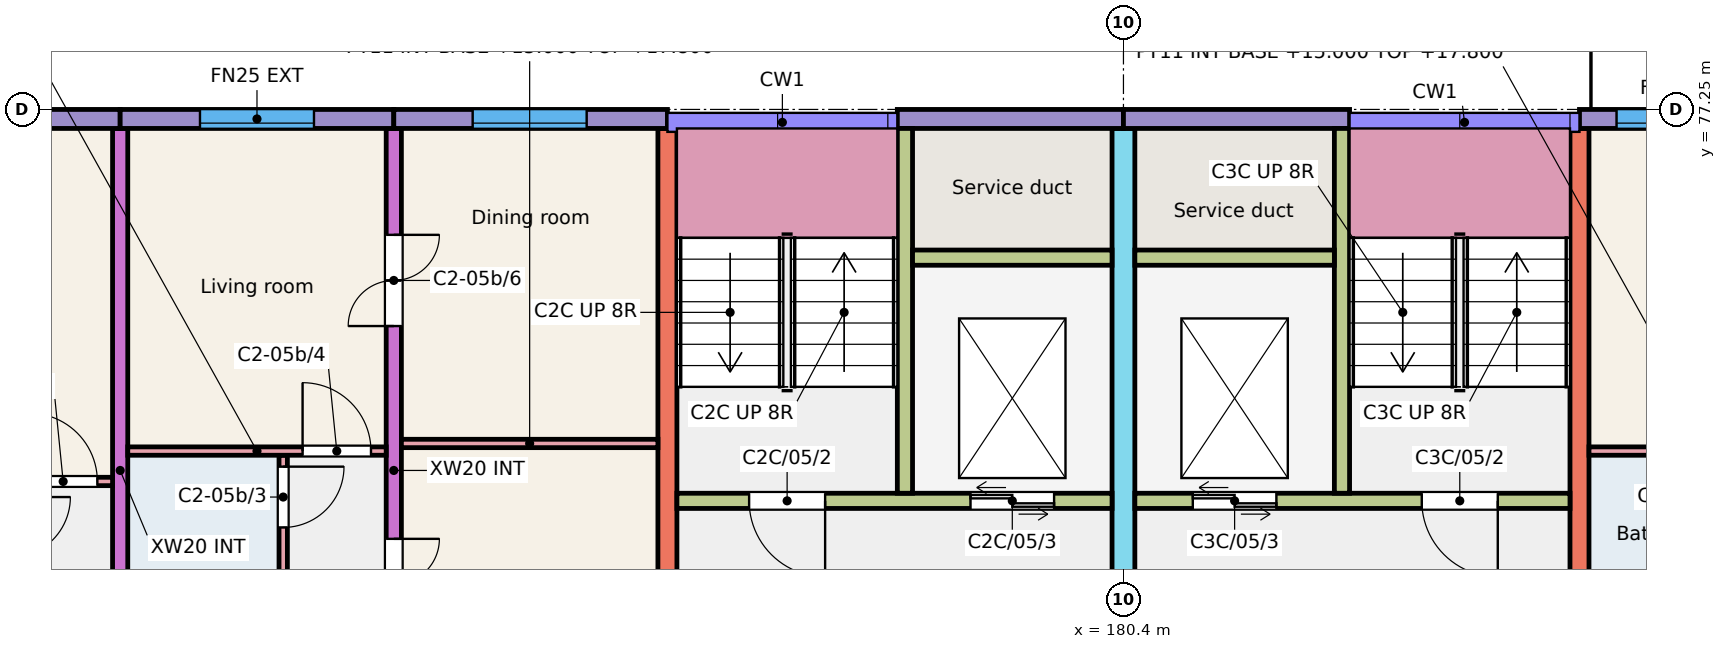
"""IFC4 building model, lengths in metres.
Left out: names, types, materials, properties, quantities, classifications, styles, units other than length and angle.
Written with IfcOpenShell. Run it as: python <this file> out.ifc"""

import sys

from ifc_helpers import new_model, si_unit, direction, frame, frame_2d, origin, place, context, subcontext, project, spatial, rectangle, extrude, element, fill, save


model = new_model("IFC4")
c1 = context("Model", 3, precision=1e-05, world=origin(), true_north=direction((0.0, 1.0)))
c2 = subcontext(c1, "Body", "Model", "MODEL_VIEW")
j1 = project(units=[si_unit("LENGTHUNIT", "METRE"), si_unit("PLANEANGLEUNIT", "RADIAN")], contexts=[c1])
p1 = place(None, origin())
s1 = spatial("IfcSite", under=j1, at=p1, CompositionType="ELEMENT")
p2 = place(p1, origin())
s2 = spatial("IfcBuilding", under=s1, at=p2, CompositionType="ELEMENT")
p3 = place(p2, frame((0.0, 0.0, 15.0)))
s3 = spatial("IfcBuildingStorey", under=s2, at=p3, CompositionType="ELEMENT", Elevation=15.0)
p4 = place(p3, frame((167.2, 68.0, 0.0), z_axis=(0.0, 0.0, 1.0), x_axis=(0.0, 1.0, 0.0)))
e1 = element("IfcWall", 1, at=p4, inside=s3, PredefinedType="SHEAR", context=c2, shape_type="SweptSolid", body=[
    extrude(rectangle(XDim=9.0, YDim=0.2, at=frame_2d((4.5, 0.0))), origin(), (0.0, 0.0, 1.0), 3.0),
])
p5 = place(p3, frame((170.8, 68.0, 0.0), z_axis=(0.0, 0.0, 1.0), x_axis=(0.0, 1.0, 0.0)))
e2 = element("IfcWall", 2, at=p5, inside=s3, PredefinedType="SHEAR", context=c2, shape_type="SweptSolid", body=[
    extrude(rectangle(XDim=9.0, YDim=0.2, at=frame_2d((4.5, 0.0))), origin(), (0.0, 0.0, 1.0), 3.0),
])
p6 = place(p5, frame((2.4, 0.0, 0.0)))
e3 = element("IfcOpeningElement", 3, at=p6, cuts=e2, PredefinedType="OPENING", context=c2, shape_type="SweptSolid", body=[
    extrude(rectangle(XDim=1.2, YDim=2.1, at=frame_2d((0.6, 1.05))), frame((0.0, 0.11, 0.0), z_axis=(0.0, -1.0, 0.0), x_axis=(1.0, 0.0, 0.0)), (0.0, 0.0, 1.0), 0.22),
])
p7 = place(p5, frame((6.4, 0.0, 0.0)))
e4 = element("IfcOpeningElement", 4, at=p7, cuts=e2, PredefinedType="OPENING", context=c2, shape_type="SweptSolid", body=[
    extrude(rectangle(XDim=1.2, YDim=2.1, at=frame_2d((0.6, 1.05))), frame((0.0, 0.11, 0.0), z_axis=(0.0, -1.0, 0.0), x_axis=(1.0, 0.0, 0.0)), (0.0, 0.0, 1.0), 0.22),
])
p8 = place(p3, frame((174.4, 68.0, 0.0), z_axis=(0.0, 0.0, 1.0), x_axis=(0.0, 1.0, 0.0)))
e5 = element("IfcWall", 5, at=p8, inside=s3, PredefinedType="SHEAR", context=c2, shape_type="SweptSolid", body=[
    extrude(rectangle(XDim=9.0, YDim=0.25, at=frame_2d((4.5, 0.0))), origin(), (0.0, 0.0, 1.0), 3.0),
])
p9 = place(p3, frame((180.4, 66.0, 0.0), z_axis=(0.0, 0.0, 1.0), x_axis=(0.0, 1.0, 0.0)))
e6 = element("IfcWall", 6, at=p9, inside=s3, PredefinedType="SHEAR", context=c2, shape_type="SweptSolid", body=[
    extrude(rectangle(XDim=11.0, YDim=0.3, at=frame_2d((5.5, 0.0))), origin(), (0.0, 0.0, 1.0), 3.0),
])
p10 = place(p9, frame((0.3, 0.0, 0.0)))
e7 = element("IfcOpeningElement", 7, at=p10, cuts=e6, PredefinedType="OPENING", context=c2, shape_type="SweptSolid", body=[
    extrude(rectangle(XDim=1.2, YDim=2.1, at=frame_2d((0.6, 1.05))), frame((0.0, 0.16, 0.0), z_axis=(0.0, -1.0, 0.0), x_axis=(1.0, 0.0, 0.0)), (0.0, 0.0, 1.0), 0.32),
])
p11 = place(p3, frame((186.4, 68.0, 0.0), z_axis=(0.0, 0.0, 1.0), x_axis=(0.0, 1.0, 0.0)))
e8 = element("IfcWall", 8, at=p11, inside=s3, PredefinedType="SHEAR", context=c2, shape_type="SweptSolid", body=[
    extrude(rectangle(XDim=9.0, YDim=0.25, at=frame_2d((4.5, 0.0))), origin(), (0.0, 0.0, 1.0), 3.0),
])
p12 = place(p3, frame((163.6, 77.125, 0.0), z_axis=(0.0, 0.0, 1.0), x_axis=(1.0, 0.0, 0.0)))
e9 = element("IfcWall", 9, at=p12, inside=s3, PredefinedType="SOLIDWALL", context=c2, shape_type="SweptSolid", body=[
    extrude(rectangle(XDim=3.6, YDim=0.25, at=frame_2d((1.8, 0.0))), origin(), (0.0, 0.0, 1.0), 3.0),
])
p13 = place(p12, frame((1.075, 0.0, 0.9)))
e10 = element("IfcOpeningElement", 10, at=p13, cuts=e9, PredefinedType="OPENING", context=c2, shape_type="SweptSolid", body=[
    extrude(rectangle(XDim=1.5, YDim=1.5, at=frame_2d((0.75, 0.75))), frame((0.0, 0.135, 0.0), z_axis=(0.0, -1.0, 0.0), x_axis=(1.0, 0.0, 0.0)), (0.0, 0.0, 1.0), 0.27),
])
p14 = place(p3, frame((167.2, 77.125, 0.0), z_axis=(0.0, 0.0, 1.0), x_axis=(1.0, 0.0, 0.0)))
e11 = element("IfcWall", 11, at=p14, inside=s3, PredefinedType="SOLIDWALL", context=c2, shape_type="SweptSolid", body=[
    extrude(rectangle(XDim=3.6, YDim=0.25, at=frame_2d((1.8, 0.0))), origin(), (0.0, 0.0, 1.0), 3.0),
])
p15 = place(p14, frame((1.05, 0.0, 0.9)))
e12 = element("IfcOpeningElement", 12, at=p15, cuts=e11, PredefinedType="OPENING", context=c2, shape_type="SweptSolid", body=[
    extrude(rectangle(XDim=1.5, YDim=1.5, at=frame_2d((0.75, 0.75))), frame((0.0, 0.135, 0.0), z_axis=(0.0, -1.0, 0.0), x_axis=(1.0, 0.0, 0.0)), (0.0, 0.0, 1.0), 0.27),
])
p16 = place(p3, frame((170.8, 77.125, 0.0), z_axis=(0.0, 0.0, 1.0), x_axis=(1.0, 0.0, 0.0)))
e13 = element("IfcWall", 13, at=p16, inside=s3, PredefinedType="SOLIDWALL", context=c2, shape_type="SweptSolid", body=[
    extrude(rectangle(XDim=3.6, YDim=0.25, at=frame_2d((1.8, 0.0))), origin(), (0.0, 0.0, 1.0), 3.0),
])
p17 = place(p16, frame((1.038, 0.0, 0.9)))
e14 = element("IfcOpeningElement", 14, at=p17, cuts=e13, PredefinedType="OPENING", context=c2, shape_type="SweptSolid", body=[
    extrude(rectangle(XDim=1.5, YDim=1.5, at=frame_2d((0.75, 0.75))), frame((0.0, 0.135, 0.0), z_axis=(0.0, -1.0, 0.0), x_axis=(1.0, 0.0, 0.0)), (0.0, 0.0, 1.0), 0.27),
])
p18 = place(p3, frame((177.425, 77.125, 0.0), z_axis=(0.0, 0.0, 1.0), x_axis=(1.0, 0.0, 0.0)))
e15 = element("IfcWall", 15, at=p18, inside=s3, PredefinedType="SOLIDWALL", context=c2, shape_type="SweptSolid", body=[
    extrude(rectangle(XDim=2.975, YDim=0.25, at=frame_2d((1.487, 0.0))), origin(), (0.0, 0.0, 1.0), 3.0),
])
p19 = place(p3, frame((174.525, 72.1, 0.0), z_axis=(0.0, 0.0, 1.0), x_axis=(1.0, 0.0, 0.0)))
e16 = element("IfcWall", 16, at=p19, inside=s3, PredefinedType="SHEAR", context=c2, shape_type="SweptSolid", body=[
    extrude(rectangle(XDim=5.725, YDim=0.2, at=frame_2d((2.863, 0.0))), origin(), (0.0, 0.0, 1.0), 3.0),
])
p20 = place(p19, frame((0.95, 0.0, 0.0)))
e17 = element("IfcOpeningElement", 17, at=p20, cuts=e16, PredefinedType="OPENING", context=c2, shape_type="SweptSolid", body=[
    extrude(rectangle(XDim=1.0, YDim=2.1, at=frame_2d((0.5, 1.05))), frame((0.0, 0.11, 0.0), z_axis=(0.0, -1.0, 0.0), x_axis=(1.0, 0.0, 0.0)), (0.0, 0.0, 1.0), 0.22),
])
p21 = place(p19, frame((3.863, 0.0, 0.0)))
e18 = element("IfcOpeningElement", 18, at=p21, cuts=e16, PredefinedType="OPENING", context=c2, shape_type="SweptSolid", body=[
    extrude(rectangle(XDim=1.1, YDim=2.1, at=frame_2d((0.55, 1.05))), frame((0.0, 0.11, 0.0), z_axis=(0.0, -1.0, 0.0), x_axis=(1.0, 0.0, 0.0)), (0.0, 0.0, 1.0), 0.22),
])
p22 = place(p3, frame((177.525, 72.2, 0.0), z_axis=(0.0, 0.0, 1.0), x_axis=(0.0, 1.0, 0.0)))
e19 = element("IfcWall", 19, at=p22, inside=s3, PredefinedType="SHEAR", context=c2, shape_type="SweptSolid", body=[
    extrude(rectangle(XDim=4.8, YDim=0.2, at=frame_2d((2.4, 0.0))), origin(), (0.0, 0.0, 1.0), 3.0),
])
p23 = place(p3, frame((177.625, 75.3, 0.0), z_axis=(0.0, 0.0, 1.0), x_axis=(1.0, 0.0, 0.0)))
e20 = element("IfcWall", 20, at=p23, inside=s3, PredefinedType="SHEAR", context=c2, shape_type="SweptSolid", body=[
    extrude(rectangle(XDim=2.625, YDim=0.2, at=frame_2d((1.312, 0.0))), origin(), (0.0, 0.0, 1.0), 3.0),
])
p24 = place(p3, frame((180.4, 77.125, 0.0), z_axis=(0.0, 0.0, 1.0), x_axis=(1.0, 0.0, 0.0)))
e21 = element("IfcWall", 21, at=p24, inside=s3, PredefinedType="SOLIDWALL", context=c2, shape_type="SweptSolid", body=[
    extrude(rectangle(XDim=2.975, YDim=0.25, at=frame_2d((1.488, 0.0))), origin(), (0.0, 0.0, 1.0), 3.0),
])
p25 = place(p3, frame((180.55, 72.1, 0.0), z_axis=(0.0, 0.0, 1.0), x_axis=(1.0, 0.0, 0.0)))
e22 = element("IfcWall", 22, at=p25, inside=s3, PredefinedType="SHEAR", context=c2, shape_type="SweptSolid", body=[
    extrude(rectangle(XDim=5.725, YDim=0.2, at=frame_2d((2.862, 0.0))), origin(), (0.0, 0.0, 1.0), 3.0),
])
p26 = place(p25, frame((3.775, 0.0, 0.0)))
e23 = element("IfcOpeningElement", 23, at=p26, cuts=e22, PredefinedType="OPENING", context=c2, shape_type="SweptSolid", body=[
    extrude(rectangle(XDim=1.0, YDim=2.1, at=frame_2d((0.5, 1.05))), frame((0.0, 0.11, 0.0), z_axis=(0.0, -1.0, 0.0), x_axis=(1.0, 0.0, 0.0)), (0.0, 0.0, 1.0), 0.22),
])
p27 = place(p25, frame((0.762, 0.0, 0.0)))
e24 = element("IfcOpeningElement", 24, at=p27, cuts=e22, PredefinedType="OPENING", context=c2, shape_type="SweptSolid", body=[
    extrude(rectangle(XDim=1.1, YDim=2.1, at=frame_2d((0.55, 1.05))), frame((0.0, 0.11, 0.0), z_axis=(0.0, -1.0, 0.0), x_axis=(1.0, 0.0, 0.0)), (0.0, 0.0, 1.0), 0.22),
])
p28 = place(p3, frame((183.275, 72.2, 0.0), z_axis=(0.0, 0.0, 1.0), x_axis=(0.0, 1.0, 0.0)))
e25 = element("IfcWall", 25, at=p28, inside=s3, PredefinedType="SHEAR", context=c2, shape_type="SweptSolid", body=[
    extrude(rectangle(XDim=4.8, YDim=0.2, at=frame_2d((2.4, 0.0))), origin(), (0.0, 0.0, 1.0), 3.0),
])
p29 = place(p3, frame((180.55, 75.3, 0.0), z_axis=(0.0, 0.0, 1.0), x_axis=(1.0, 0.0, 0.0)))
e26 = element("IfcWall", 26, at=p29, inside=s3, PredefinedType="SHEAR", context=c2, shape_type="SweptSolid", body=[
    extrude(rectangle(XDim=2.625, YDim=0.2, at=frame_2d((1.312, 0.0))), origin(), (0.0, 0.0, 1.0), 3.0),
])
p30 = place(p3, frame((186.4, 77.125, 0.0), z_axis=(0.0, 0.0, 1.0), x_axis=(1.0, 0.0, 0.0)))
e27 = element("IfcWall", 27, at=p30, inside=s3, PredefinedType="SOLIDWALL", context=c2, shape_type="SweptSolid", body=[
    extrude(rectangle(XDim=3.6, YDim=0.25, at=frame_2d((1.8, 0.0))), origin(), (0.0, 0.0, 1.0), 3.0),
])
p31 = place(p30, frame((0.488, 0.0, 0.9)))
e28 = element("IfcOpeningElement", 28, at=p31, cuts=e27, PredefinedType="OPENING", context=c2, shape_type="SweptSolid", body=[
    extrude(rectangle(XDim=1.5, YDim=1.5, at=frame_2d((0.75, 0.75))), frame((0.0, 0.135, 0.0), z_axis=(0.0, -1.0, 0.0), x_axis=(1.0, 0.0, 0.0)), (0.0, 0.0, 1.0), 0.27),
])
p32 = place(p30, frame((2.45, 0.0, 0.0)))
e29 = element("IfcOpeningElement", 29, at=p32, cuts=e27, PredefinedType="OPENING", context=c2, shape_type="SweptSolid", body=[
    extrude(rectangle(XDim=1.0, YDim=2.1, at=frame_2d((0.5, 1.05))), frame((0.0, 0.135, 0.0), z_axis=(0.0, -1.0, 0.0), x_axis=(1.0, 0.0, 0.0)), (0.0, 0.0, 1.0), 0.27),
])
p33 = place(p3, frame((163.75, 72.355, 0.0), z_axis=(0.0, 0.0, 1.0), x_axis=(1.0, 0.0, 0.0)))
e30 = element("IfcWall", 30, at=p33, inside=s3, PredefinedType="PARTITIONING", context=c2, shape_type="SweptSolid", body=[
    extrude(rectangle(XDim=3.35, YDim=0.11, at=frame_2d((1.675, 0.0))), origin(), (0.0, 0.0, 1.0), 2.8),
])
p34 = place(p33, frame((2.25, 0.0, 0.0)))
e31 = element("IfcOpeningElement", 31, at=p34, cuts=e30, PredefinedType="OPENING", context=c2, shape_type="SweptSolid", body=[
    extrude(rectangle(XDim=0.9, YDim=2.1, at=frame_2d((0.45, 1.05))), frame((0.0, 0.065, 0.0), z_axis=(0.0, -1.0, 0.0), x_axis=(1.0, 0.0, 0.0)), (0.0, 0.0, 1.0), 0.13),
])
p35 = place(p3, frame((169.345, 68.0, 0.0), z_axis=(0.0, 0.0, 1.0), x_axis=(0.0, 1.0, 0.0)))
e32 = element("IfcWall", 32, at=p35, inside=s3, PredefinedType="PARTITIONING", context=c2, shape_type="SweptSolid", body=[
    extrude(rectangle(XDim=4.7, YDim=0.11, at=frame_2d((2.35, 0.0))), origin(), (0.0, 0.0, 1.0), 2.8),
])
p36 = place(p35, frame((0.2, 0.0, 0.0)))
e33 = element("IfcOpeningElement", 33, at=p36, cuts=e32, PredefinedType="OPENING", context=c2, shape_type="SweptSolid", body=[
    extrude(rectangle(XDim=0.8, YDim=2.1, at=frame_2d((0.4, 1.05))), frame((0.0, 0.065, 0.0), z_axis=(0.0, -1.0, 0.0), x_axis=(1.0, 0.0, 0.0)), (0.0, 0.0, 1.0), 0.13),
])
p37 = place(p35, frame((3.75, 0.0, 0.0)))
e34 = element("IfcOpeningElement", 34, at=p37, cuts=e32, PredefinedType="OPENING", context=c2, shape_type="SweptSolid", body=[
    extrude(rectangle(XDim=0.8, YDim=2.1, at=frame_2d((0.4, 1.05))), frame((0.0, 0.065, 0.0), z_axis=(0.0, -1.0, 0.0), x_axis=(1.0, 0.0, 0.0)), (0.0, 0.0, 1.0), 0.13),
])
p38 = place(p3, frame((167.3, 72.755, 0.0), z_axis=(0.0, 0.0, 1.0), x_axis=(1.0, 0.0, 0.0)))
e35 = element("IfcWall", 35, at=p38, inside=s3, PredefinedType="PARTITIONING", context=c2, shape_type="SweptSolid", body=[
    extrude(rectangle(XDim=3.4, YDim=0.11, at=frame_2d((1.7, 0.0))), origin(), (0.0, 0.0, 1.0), 2.8),
])
p39 = place(p38, frame((2.3, 0.0, 0.0)))
e36 = element("IfcOpeningElement", 36, at=p39, cuts=e35, PredefinedType="OPENING", context=c2, shape_type="SweptSolid", body=[
    extrude(rectangle(XDim=0.9, YDim=2.1, at=frame_2d((0.45, 1.05))), frame((0.0, 0.065, 0.0), z_axis=(0.0, -1.0, 0.0), x_axis=(1.0, 0.0, 0.0)), (0.0, 0.0, 1.0), 0.13),
])
p40 = place(p3, frame((170.9, 72.855, 0.0), z_axis=(0.0, 0.0, 1.0), x_axis=(1.0, 0.0, 0.0)))
e37 = element("IfcWall", 37, at=p40, inside=s3, PredefinedType="PARTITIONING", context=c2, shape_type="SweptSolid", body=[
    extrude(rectangle(XDim=3.375, YDim=0.11, at=frame_2d((1.688, 0.0))), origin(), (0.0, 0.0, 1.0), 2.8),
])
p41 = place(p3, frame((186.525, 72.755, 0.0), z_axis=(0.0, 0.0, 1.0), x_axis=(1.0, 0.0, 0.0)))
e38 = element("IfcWall", 38, at=p41, inside=s3, PredefinedType="PARTITIONING", context=c2, shape_type="SweptSolid", body=[
    extrude(rectangle(XDim=3.375, YDim=0.11, at=frame_2d((1.688, 0.0))), origin(), (0.0, 0.0, 1.0), 2.8),
])
p42 = place(p41, frame((2.275, 0.0, 0.0)))
e39 = element("IfcOpeningElement", 39, at=p42, cuts=e38, PredefinedType="OPENING", context=c2, shape_type="SweptSolid", body=[
    extrude(rectangle(XDim=0.9, YDim=2.1, at=frame_2d((0.45, 1.05))), frame((0.0, 0.065, 0.0), z_axis=(0.0, -1.0, 0.0), x_axis=(1.0, 0.0, 0.0)), (0.0, 0.0, 1.0), 0.13),
])
p43 = place(p17, origin())
e40 = element("IfcWindow", 40, at=p43, inside=s3, PartitioningType="SINGLE_PANEL", PredefinedType="WINDOW", context=c2, shape_type="SweptSolid", body=[
    extrude(rectangle(XDim=1.5, YDim=1.5, at=frame_2d((0.75, 0.75))), frame((0.0, -0.025, 0.0), z_axis=(0.0, -1.0, 0.0), x_axis=(1.0, 0.0, 0.0)), (0.0, 0.0, 1.0), 0.06),
])
fill(e14, e40)
p44 = place(p15, origin())
e41 = element("IfcWindow", 41, at=p44, inside=s3, PartitioningType="SINGLE_PANEL", PredefinedType="WINDOW", context=c2, shape_type="SweptSolid", body=[
    extrude(rectangle(XDim=1.5, YDim=1.5, at=frame_2d((0.75, 0.75))), frame((0.0, -0.025, 0.0), z_axis=(0.0, -1.0, 0.0), x_axis=(1.0, 0.0, 0.0)), (0.0, 0.0, 1.0), 0.06),
])
fill(e12, e41)
p45 = place(p31, origin())
e42 = element("IfcWindow", 42, at=p45, inside=s3, PartitioningType="SINGLE_PANEL", PredefinedType="WINDOW", context=c2, shape_type="SweptSolid", body=[
    extrude(rectangle(XDim=1.5, YDim=1.5, at=frame_2d((0.75, 0.75))), frame((0.0, -0.025, 0.0), z_axis=(0.0, -1.0, 0.0), x_axis=(1.0, 0.0, 0.0)), (0.0, 0.0, 1.0), 0.06),
])
fill(e28, e42)
p46 = place(p34, origin())
e43 = element("IfcDoor", 43, at=p46, inside=s3, OperationType="SINGLE_SWING_LEFT", PredefinedType="DOOR", context=c2, shape_type="SweptSolid", body=[
    extrude(rectangle(XDim=0.9, YDim=2.1, at=frame_2d((0.45, 1.05))), frame((0.0, 0.025, 0.0), z_axis=(0.0, -1.0, 0.0), x_axis=(1.0, 0.0, 0.0)), (0.0, 0.0, 1.0), 0.05),
])
fill(e31, e43)
p47 = place(p37, origin())
e44 = element("IfcDoor", 44, at=p47, inside=s3, OperationType="SINGLE_SWING_RIGHT", PredefinedType="DOOR", context=c2, shape_type="SweptSolid", body=[
    extrude(rectangle(XDim=0.8, YDim=2.1, at=frame_2d((0.4, 1.05))), frame((0.0, 0.025, 0.0), z_axis=(0.0, -1.0, 0.0), x_axis=(1.0, 0.0, 0.0)), (0.0, 0.0, 1.0), 0.05),
])
fill(e34, e44)
p48 = place(p39, origin())
e45 = element("IfcDoor", 45, at=p48, inside=s3, OperationType="SINGLE_SWING_LEFT", PredefinedType="DOOR", context=c2, shape_type="SweptSolid", body=[
    extrude(rectangle(XDim=0.9, YDim=2.1, at=frame_2d((0.45, 1.05))), frame((0.0, 0.025, 0.0), z_axis=(0.0, -1.0, 0.0), x_axis=(1.0, 0.0, 0.0)), (0.0, 0.0, 1.0), 0.05),
])
fill(e36, e45)
p49 = place(p6, origin())
e46 = element("IfcDoor", 46, at=p49, inside=s3, OperationType="DOUBLE_DOOR_SINGLE_SWING", PredefinedType="DOOR", context=c2, shape_type="SweptSolid", body=[
    extrude(rectangle(XDim=1.2, YDim=2.1, at=frame_2d((0.6, 1.05))), frame((0.0, 0.025, 0.0), z_axis=(0.0, -1.0, 0.0), x_axis=(1.0, 0.0, 0.0)), (0.0, 0.0, 1.0), 0.05),
])
fill(e3, e46)
p50 = place(p7, origin())
e47 = element("IfcDoor", 47, at=p50, inside=s3, OperationType="DOUBLE_DOOR_SINGLE_SWING", PredefinedType="DOOR", context=c2, shape_type="SweptSolid", body=[
    extrude(rectangle(XDim=1.2, YDim=2.1, at=frame_2d((0.6, 1.05))), frame((0.0, 0.025, 0.0), z_axis=(0.0, -1.0, 0.0), x_axis=(1.0, 0.0, 0.0)), (0.0, 0.0, 1.0), 0.05),
])
fill(e4, e47)
p51 = place(p20, origin())
e48 = element("IfcDoor", 48, at=p51, inside=s3, OperationType="SINGLE_SWING_RIGHT", PredefinedType="DOOR", context=c2, shape_type="SweptSolid", body=[
    extrude(rectangle(XDim=1.0, YDim=2.1, at=frame_2d((0.5, 1.05))), frame((0.0, 0.025, 0.0), z_axis=(0.0, -1.0, 0.0), x_axis=(1.0, 0.0, 0.0)), (0.0, 0.0, 1.0), 0.05),
])
fill(e17, e48)
p52 = place(p21, origin())
e49 = element("IfcDoor", 49, at=p52, inside=s3, OperationType="DOUBLE_DOOR_SLIDING", PredefinedType="DOOR", context=c2, shape_type="SweptSolid", body=[
    extrude(rectangle(XDim=1.1, YDim=2.1, at=frame_2d((0.55, 1.05))), frame((0.0, 0.025, 0.0), z_axis=(0.0, -1.0, 0.0), x_axis=(1.0, 0.0, 0.0)), (0.0, 0.0, 1.0), 0.05),
])
fill(e18, e49)
p53 = place(p26, origin())
e50 = element("IfcDoor", 50, at=p53, inside=s3, OperationType="SINGLE_SWING_RIGHT", PredefinedType="DOOR", context=c2, shape_type="SweptSolid", body=[
    extrude(rectangle(XDim=1.0, YDim=2.1, at=frame_2d((0.5, 1.05))), frame((0.0, 0.025, 0.0), z_axis=(0.0, -1.0, 0.0), x_axis=(1.0, 0.0, 0.0)), (0.0, 0.0, 1.0), 0.05),
])
fill(e23, e50)
p54 = place(p27, origin())
e51 = element("IfcDoor", 51, at=p54, inside=s3, OperationType="DOUBLE_DOOR_SLIDING", PredefinedType="DOOR", context=c2, shape_type="SweptSolid", body=[
    extrude(rectangle(XDim=1.1, YDim=2.1, at=frame_2d((0.55, 1.05))), frame((0.0, 0.025, 0.0), z_axis=(0.0, -1.0, 0.0), x_axis=(1.0, 0.0, 0.0)), (0.0, 0.0, 1.0), 0.05),
])
fill(e24, e51)
save(model, sys.argv[1])
